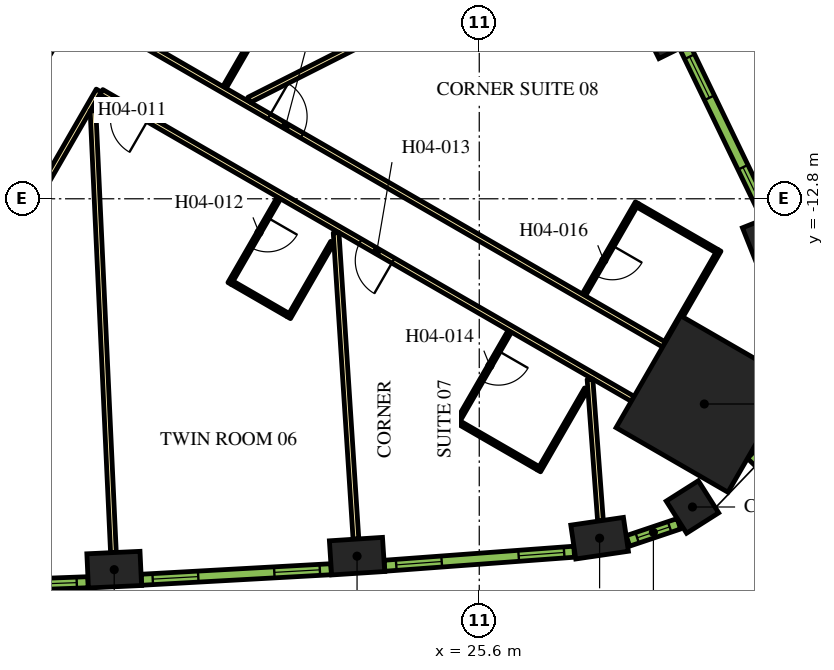
"""IFC4 building model, lengths in metres.
Left out: names, types, materials, properties, quantities, classifications, styles, units other than length and angle.
Written with IfcOpenShell. Run it as: python <this file> out.ifc"""

import sys

from ifc_helpers import new_model, si_unit, direction, frame, frame_2d, origin, origin_2d, place, context, subcontext, project, spatial, rectangle, extrude, element, fill, save


model = new_model("IFC4")
c1 = context("Model", 3, precision=1e-05, world=origin(), true_north=direction((0.0, 1.0)))
c2 = subcontext(c1, "Body", "Model", "MODEL_VIEW")
j1 = project(units=[si_unit("LENGTHUNIT", "METRE"), si_unit("PLANEANGLEUNIT", "RADIAN")], contexts=[c1])
p1 = place(None, origin())
s1 = spatial("IfcSite", under=j1, at=p1, CompositionType="ELEMENT")
p2 = place(p1, origin())
s2 = spatial("IfcBuilding", under=s1, at=p2, CompositionType="ELEMENT")
p3 = place(p2, frame((0.0, 0.0, 62.7)))
s3 = spatial("IfcBuildingStorey", under=s2, at=p3, CompositionType="ELEMENT", Elevation=62.7)
p4 = place(p3, frame((31.522, -18.199, 0.0), z_axis=(0.0, 0.0, 1.0), x_axis=(0.866025403784, -0.5, 0.0)))
e1 = element("IfcColumn", 1, at=p4, inside=s3, PredefinedType="COLUMN", context=c2, shape_type="SweptSolid", body=[
    extrude(rectangle(XDim=3.4, YDim=3.4, at=origin_2d()), origin(), (0.0, 0.0, 1.0), 3.9),
])
for number, where, z_axis, x_axis in (
    (2, (15.994, -22.558, 0.0), (0.0, 0.0, 1.0), (0.999, 0.046, 0.0)),
    (3, (22.385, -22.204, 0.0), (0.0, 0.0, 1.0), (0.998, 0.065, 0.0)),
    (4, (28.767, -21.731, 0.0), (0.0, 0.0, 1.0), (0.989, 0.145, 0.0)),
):
    element("IfcColumn", number, at=place(p3, frame(where, z_axis=z_axis, x_axis=x_axis)), inside=s3, PredefinedType="COLUMN", context=c2, shape_type="SweptSolid", body=[
        extrude(rectangle(XDim=1.4, YDim=0.9, at=origin_2d()), origin(), (0.0, 0.0, 1.0), 3.9),
    ])
p5 = place(p3, frame((31.21, -20.91, 0.0), z_axis=(0.0, 0.0, 1.0), x_axis=(0.844485001826, 0.535579202071, 0.0)))
e5 = element("IfcColumn", 5, at=p5, inside=s3, PredefinedType="COLUMN", context=c2, shape_type="SweptSolid", body=[
    extrude(rectangle(XDim=1.0, YDim=1.0, at=origin_2d()), origin(), (0.0, 0.0, 1.0), 3.9),
])
for number, where, z_axis, x_axis in (
    (6, (33.203, -14.047, 0.0), (0.0, 0.0, 1.0), (-0.369, 0.929, 0.0)),
    (7, (30.421, -8.284, 0.0), (0.0, 0.0, 1.0), (-0.443, 0.897, 0.0)),
):
    element("IfcColumn", number, at=place(p3, frame(where, z_axis=z_axis, x_axis=x_axis)), inside=s3, PredefinedType="COLUMN", context=c2, shape_type="SweptSolid", body=[
        extrude(rectangle(XDim=1.4, YDim=0.9, at=origin_2d()), origin(), (0.0, 0.0, 1.0), 3.9),
    ])
p6 = place(p3, frame((11.695, -12.644, 0.0), z_axis=(0.0, 0.0, 1.0), x_axis=(0.500010229568, 0.86601949766, 0.0)))
e8 = element("IfcWall", 8, at=p6, inside=s3, PredefinedType="SOLIDWALL", context=c2, shape_type="SweptSolid", body=[
    extrude(rectangle(XDim=9.326, YDim=0.9, at=frame_2d((4.663, 0.0))), origin(), (0.0, 0.0, 1.0), 3.9),
])
p7 = place(p3, frame((12.885, -9.431, 0.0), z_axis=(0.0, 0.0, 1.0), x_axis=(0.500020560727, 0.866013532718, 0.0)))
e9 = element("IfcWall", 9, at=p7, inside=s3, PredefinedType="SOLIDWALL", context=c2, shape_type="SweptSolid", body=[
    extrude(rectangle(XDim=3.45, YDim=0.25, at=frame_2d((1.725, 0.0))), origin(), (0.0, 0.0, 1.0), 3.9),
])
p8 = place(p3, frame((16.412, -8.523, 0.0), z_axis=(0.0, 0.0, 1.0), x_axis=(0.866022197818, -0.500005552856, 0.0)))
e10 = element("IfcWall", 10, at=p8, inside=s3, PredefinedType="PARTITIONING", context=c2, shape_type="SweptSolid", body=[
    extrude(rectangle(XDim=16.224, YDim=0.15, at=frame_2d((8.112, 0.0))), origin(), (0.0, 0.0, 1.0), 2.75),
])
p9 = place(p8, frame((4.223, 0.0, 0.0)))
e11 = element("IfcOpeningElement", 11, at=p9, cuts=e10, PredefinedType="OPENING", context=c2, shape_type="SweptSolid", body=[
    extrude(rectangle(XDim=1.0, YDim=2.1, at=frame_2d((0.5, 1.05))), frame((0.0, 0.085, 0.0), z_axis=(0.0, -1.0, 0.0), x_axis=(1.0, 0.0, 0.0)), (0.0, 0.0, 1.0), 0.17),
])
p10 = place(p3, frame((15.587, -9.952, 0.0), z_axis=(0.0, 0.0, 1.0), x_axis=(-0.500016618951, -0.866015808616, 0.0)))
e12 = element("IfcWall", 12, at=p10, inside=s3, PredefinedType="PARTITIONING", context=c2, shape_type="SweptSolid", body=[
    extrude(rectangle(XDim=5.268, YDim=0.15, at=frame_2d((2.634, 0.0))), origin(), (0.0, 0.0, 1.0), 2.75),
])
p11 = place(p3, frame((29.638, -18.064, 0.0), z_axis=(0.0, 0.0, 1.0), x_axis=(-0.866026175601, 0.499998663172, 0.0)))
e13 = element("IfcWall", 13, at=p11, inside=s3, PredefinedType="PARTITIONING", context=c2, shape_type="SweptSolid", body=[
    extrude(rectangle(XDim=16.144, YDim=0.15, at=frame_2d((8.072, 0.0))), origin(), (0.0, 0.0, 1.0), 2.75),
])
p12 = place(p11, frame((14.714, 0.0, 0.0)))
e14 = element("IfcOpeningElement", 14, at=p12, cuts=e13, PredefinedType="OPENING", context=c2, shape_type="SweptSolid", body=[
    extrude(rectangle(XDim=1.0, YDim=2.1, at=frame_2d((0.5, 1.05))), frame((0.0, 0.085, 0.0), z_axis=(0.0, -1.0, 0.0), x_axis=(1.0, 0.0, 0.0)), (0.0, 0.0, 1.0), 0.17),
])
p13 = place(p11, frame((7.275, 0.0, 0.0)))
e15 = element("IfcOpeningElement", 15, at=p13, cuts=e13, PredefinedType="OPENING", context=c2, shape_type="SweptSolid", body=[
    extrude(rectangle(XDim=1.0, YDim=2.1, at=frame_2d((0.5, 1.05))), frame((0.0, 0.085, 0.0), z_axis=(0.0, -1.0, 0.0), x_axis=(1.0, 0.0, 0.0)), (0.0, 0.0, 1.0), 0.17),
])
p14 = place(p3, frame((15.973, -22.109, 0.0), z_axis=(0.0, 0.0, 1.0), x_axis=(-0.046191717129, 0.998932592955, 0.0)))
e16 = element("IfcWall", 16, at=p14, inside=s3, PredefinedType="PARTITIONING", context=c2, shape_type="SweptSolid", body=[
    extrude(rectangle(XDim=11.638, YDim=0.15, at=frame_2d((5.819, 0.0))), origin(), (0.0, 0.0, 1.0), 2.75),
])
p15 = place(p3, frame((29.12, -5.356, 0.0), z_axis=(0.0, 0.0, 1.0), x_axis=(-0.892401965553, -0.451241323327, 0.0)))
e17 = element("IfcWall", 17, at=p15, inside=s3, PredefinedType="PARTITIONING", context=c2, shape_type="SweptSolid", body=[
    extrude(rectangle(XDim=10.729, YDim=0.15, at=frame_2d((5.364, 0.0))), origin(), (0.0, 0.0, 1.0), 2.75),
])
p16 = place(p3, frame((22.355, -21.754, 0.0), z_axis=(0.0, 0.0, 1.0), x_axis=(-0.064639533143, 0.997908678565, 0.0)))
e18 = element("IfcWall", 18, at=p16, inside=s3, PredefinedType="PARTITIONING", context=c2, shape_type="SweptSolid", body=[
    extrude(rectangle(XDim=8.079, YDim=0.15, at=frame_2d((4.04, 0.0))), origin(), (0.0, 0.0, 1.0), 2.75),
])
p17 = place(p3, frame((28.79, -21.273, 0.0), z_axis=(0.0, 0.0, 1.0), x_axis=(-0.07382592098, 0.997271143366, 0.0)))
e19 = element("IfcWall", 19, at=p17, inside=s3, PredefinedType="PARTITIONING", context=c2, shape_type="SweptSolid", body=[
    extrude(rectangle(XDim=3.734, YDim=0.15, at=frame_2d((1.867, 0.0))), origin(), (0.0, 0.0, 1.0), 2.75),
])
p18 = place(p3, frame((20.33, -12.777, 0.0), z_axis=(0.0, 0.0, 1.0), x_axis=(-0.500006934395, -0.866021400173, 0.0)))
e20 = element("IfcWall", 20, at=p18, inside=s3, PredefinedType="PARTITIONING", context=c2, shape_type="SweptSolid", body=[
    extrude(rectangle(XDim=2.6, YDim=0.1, at=frame_2d((1.3, 0.0))), origin(), (0.0, 0.0, 1.0), 2.75),
])
p19 = place(p18, frame((0.6, 0.0, 0.0)))
e21 = element("IfcOpeningElement", 21, at=p19, cuts=e20, PredefinedType="OPENING", context=c2, shape_type="SweptSolid", body=[
    extrude(rectangle(XDim=0.9, YDim=2.1, at=frame_2d((0.45, 1.05))), frame((0.0, 0.06, 0.0), z_axis=(0.0, -1.0, 0.0), x_axis=(1.0, 0.0, 0.0)), (0.0, 0.0, 1.0), 0.12),
])
p20 = place(p3, frame((19.098, -15.01, 0.0), z_axis=(0.0, 0.0, 1.0), x_axis=(0.86605165483, -0.499954529098, 0.0)))
e22 = element("IfcWall", 22, at=p20, inside=s3, PredefinedType="PARTITIONING", context=c2, shape_type="SweptSolid", body=[
    extrude(rectangle(XDim=1.7, YDim=0.1, at=frame_2d((0.85, 0.0))), origin(), (0.0, 0.0, 1.0), 2.75),
])
p21 = place(p3, frame((21.734, -13.945, 0.0), z_axis=(0.0, 0.0, 1.0), x_axis=(-0.500014693593, -0.866016920268, 0.0)))
e23 = element("IfcWall", 23, at=p21, inside=s3, PredefinedType="PARTITIONING", context=c2, shape_type="SweptSolid", body=[
    extrude(rectangle(XDim=2.29, YDim=0.1, at=frame_2d((1.145, 0.0))), origin(), (0.0, 0.0, 1.0), 2.75),
])
p22 = place(p3, frame((26.405, -16.284, 0.0), z_axis=(0.0, 0.0, 1.0), x_axis=(-0.49998411664, -0.866034573852, 0.0)))
e24 = element("IfcWall", 24, at=p22, inside=s3, PredefinedType="PARTITIONING", context=c2, shape_type="SweptSolid", body=[
    extrude(rectangle(XDim=2.8, YDim=0.1, at=frame_2d((1.4, 0.0))), origin(), (0.0, 0.0, 1.0), 2.75),
])
p23 = place(p22, frame((0.6, 0.0, 0.0)))
e25 = element("IfcOpeningElement", 25, at=p23, cuts=e24, PredefinedType="OPENING", context=c2, shape_type="SweptSolid", body=[
    extrude(rectangle(XDim=0.9, YDim=2.1, at=frame_2d((0.45, 1.05))), frame((0.0, 0.06, 0.0), z_axis=(0.0, -1.0, 0.0), x_axis=(1.0, 0.0, 0.0)), (0.0, 0.0, 1.0), 0.12),
])
p24 = place(p3, frame((25.073, -18.691, 0.0), z_axis=(0.0, 0.0, 1.0), x_axis=(0.866024647952, -0.500001309137, 0.0)))
e26 = element("IfcWall", 26, at=p24, inside=s3, PredefinedType="PARTITIONING", context=c2, shape_type="SweptSolid", body=[
    extrude(rectangle(XDim=2.4, YDim=0.1, at=frame_2d((1.2, 0.0))), origin(), (0.0, 0.0, 1.0), 2.75),
])
p25 = place(p3, frame((28.415, -17.802, 0.0), z_axis=(0.0, 0.0, 1.0), x_axis=(-0.499945955465, -0.866056604163, 0.0)))
e27 = element("IfcWall", 27, at=p25, inside=s3, PredefinedType="PARTITIONING", context=c2, shape_type="SweptSolid", body=[
    extrude(rectangle(XDim=2.49, YDim=0.1, at=frame_2d((1.245, 0.0))), origin(), (0.0, 0.0, 1.0), 2.75),
])
p26 = place(p3, frame((29.752, -12.905, 0.0), z_axis=(0.0, 0.0, 1.0), x_axis=(-0.500049511043, -0.865996816683, 0.0)))
e28 = element("IfcWall", 28, at=p26, inside=s3, PredefinedType="PARTITIONING", context=c2, shape_type="SweptSolid", body=[
    extrude(rectangle(XDim=2.8, YDim=0.1, at=frame_2d((1.4, 0.0))), origin(), (0.0, 0.0, 1.0), 2.75),
])
p27 = place(p26, frame((1.3, 0.0, 0.0)))
e29 = element("IfcOpeningElement", 29, at=p27, cuts=e28, PredefinedType="OPENING", context=c2, shape_type="SweptSolid", body=[
    extrude(rectangle(XDim=0.9, YDim=2.1, at=frame_2d((0.45, 1.05))), frame((0.0, 0.06, 0.0), z_axis=(0.0, -1.0, 0.0), x_axis=(1.0, 0.0, 0.0)), (0.0, 0.0, 1.0), 0.12),
])
p28 = place(p3, frame((29.771, -12.973, 0.0), z_axis=(0.0, 0.0, 1.0), x_axis=(0.865980596518, -0.500077600433, 0.0)))
e30 = element("IfcWall", 30, at=p28, inside=s3, PredefinedType="PARTITIONING", context=c2, shape_type="SweptSolid", body=[
    extrude(rectangle(XDim=2.4, YDim=0.1, at=frame_2d((1.2, 0.0))), origin(), (0.0, 0.0, 1.0), 2.75),
])
p29 = place(p3, frame((30.518, -16.58, 0.0), z_axis=(0.0, 0.0, 1.0), x_axis=(0.49998411664, 0.866034573852, 0.0)))
e31 = element("IfcWall", 31, at=p29, inside=s3, PredefinedType="PARTITIONING", context=c2, shape_type="SweptSolid", body=[
    extrude(rectangle(XDim=2.8, YDim=0.1, at=frame_2d((1.4, 0.0))), origin(), (0.0, 0.0, 1.0), 2.75),
])
p30 = place(p3, frame((20.109, -7.771, 0.0), z_axis=(0.0, 0.0, 1.0), x_axis=(-0.500077573772, -0.865980611914, 0.0)))
e32 = element("IfcWall", 32, at=p30, inside=s3, PredefinedType="PARTITIONING", context=c2, shape_type="SweptSolid", body=[
    extrude(rectangle(XDim=2.42, YDim=0.1, at=frame_2d((1.21, 0.0))), origin(), (0.0, 0.0, 1.0), 2.75),
])
p31 = place(p3, frame((10.31, -23.074, 0.0), z_axis=(0.0, 0.0, 1.0), x_axis=(0.999317974969, 0.036926750529, 0.0)))
e33 = element("IfcWall", 33, at=p31, inside=s3, PredefinedType="SOLIDWALL", context=c2, shape_type="SweptSolid", body=[
    extrude(rectangle(XDim=4.998, YDim=0.29, at=frame_2d((2.499, 0.0))), origin(), (0.0, 0.0, 1.0), 3.65),
])
p32 = place(p31, frame((0.297, 0.0, 0.9)))
e34 = element("IfcOpeningElement", 34, at=p32, cuts=e33, PredefinedType="OPENING", context=c2, shape_type="SweptSolid", body=[
    extrude(rectangle(XDim=1.2, YDim=2.15, at=frame_2d((0.6, 1.075))), frame((0.0, 0.155, 0.0), z_axis=(0.0, -1.0, 0.0), x_axis=(1.0, 0.0, 0.0)), (0.0, 0.0, 1.0), 0.31),
])
p33 = place(p31, frame((3.501, 0.0, 0.9)))
e35 = element("IfcOpeningElement", 35, at=p33, cuts=e33, PredefinedType="OPENING", context=c2, shape_type="SweptSolid", body=[
    extrude(rectangle(XDim=1.2, YDim=2.15, at=frame_2d((0.6, 1.075))), frame((0.0, 0.155, 0.0), z_axis=(0.0, -1.0, 0.0), x_axis=(1.0, 0.0, 0.0)), (0.0, 0.0, 1.0), 0.31),
])
p34 = place(p3, frame((16.711, -22.824, 0.0), z_axis=(0.0, 0.0, 1.0), x_axis=(0.998464708705, 0.055391564976, 0.0)))
e36 = element("IfcWall", 36, at=p34, inside=s3, PredefinedType="SOLIDWALL", context=c2, shape_type="SweptSolid", body=[
    extrude(rectangle(XDim=4.998, YDim=0.29, at=frame_2d((2.499, 0.0))), origin(), (0.0, 0.0, 1.0), 3.65),
])
p35 = place(p34, frame((0.297, 0.0, 0.9)))
e37 = element("IfcOpeningElement", 37, at=p35, cuts=e36, PredefinedType="OPENING", context=c2, shape_type="SweptSolid", body=[
    extrude(rectangle(XDim=1.2, YDim=2.15, at=frame_2d((0.6, 1.075))), frame((0.0, 0.155, 0.0), z_axis=(0.0, -1.0, 0.0), x_axis=(1.0, 0.0, 0.0)), (0.0, 0.0, 1.0), 0.31),
])
p36 = place(p34, frame((3.501, 0.0, 0.9)))
e38 = element("IfcOpeningElement", 38, at=p36, cuts=e36, PredefinedType="OPENING", context=c2, shape_type="SweptSolid", body=[
    extrude(rectangle(XDim=1.2, YDim=2.15, at=frame_2d((0.6, 1.075))), frame((0.0, 0.155, 0.0), z_axis=(0.0, -1.0, 0.0), x_axis=(1.0, 0.0, 0.0)), (0.0, 0.0, 1.0), 0.31),
])
p37 = place(p3, frame((23.106, -22.456, 0.0), z_axis=(0.0, 0.0, 1.0), x_axis=(0.997266290399, 0.073891447643, 0.0)))
e39 = element("IfcWall", 39, at=p37, inside=s3, PredefinedType="SOLIDWALL", context=c2, shape_type="SweptSolid", body=[
    extrude(rectangle(XDim=5.006, YDim=0.29, at=frame_2d((2.503, 0.0))), origin(), (0.0, 0.0, 1.0), 3.65),
])
p38 = place(p37, frame((0.31, 0.0, 0.9)))
e40 = element("IfcOpeningElement", 40, at=p38, cuts=e39, PredefinedType="OPENING", context=c2, shape_type="SweptSolid", body=[
    extrude(rectangle(XDim=1.2, YDim=2.15, at=frame_2d((0.6, 1.075))), frame((0.0, 0.155, 0.0), z_axis=(0.0, -1.0, 0.0), x_axis=(1.0, 0.0, 0.0)), (0.0, 0.0, 1.0), 0.31),
])
p39 = place(p37, frame((3.54, 0.0, 0.9)))
e41 = element("IfcOpeningElement", 41, at=p39, cuts=e39, PredefinedType="OPENING", context=c2, shape_type="SweptSolid", body=[
    extrude(rectangle(XDim=1.2, YDim=2.15, at=frame_2d((0.6, 1.075))), frame((0.0, 0.155, 0.0), z_axis=(0.0, -1.0, 0.0), x_axis=(1.0, 0.0, 0.0)), (0.0, 0.0, 1.0), 0.31),
])
p40 = place(p3, frame((29.512, -21.802, 0.0), z_axis=(0.0, 0.0, 1.0), x_axis=(0.947903891592, 0.318556450734, 0.0)))
e42 = element("IfcWall", 42, at=p40, inside=s3, PredefinedType="SOLIDWALL", context=c2, shape_type="SweptSolid", body=[
    extrude(rectangle(XDim=1.415, YDim=0.29, at=frame_2d((0.708, 0.0))), origin(), (0.0, 0.0, 1.0), 3.65),
])
p41 = place(p40, frame((0.257, 0.0, 0.9)))
e43 = element("IfcOpeningElement", 43, at=p41, cuts=e42, PredefinedType="OPENING", context=c2, shape_type="SweptSolid", body=[
    extrude(rectangle(XDim=0.9, YDim=2.15, at=frame_2d((0.45, 1.075))), frame((0.0, 0.155, 0.0), z_axis=(0.0, -1.0, 0.0), x_axis=(1.0, 0.0, 0.0)), (0.0, 0.0, 1.0), 0.31),
])
p42 = place(p3, frame((32.762, -19.732, 0.0), z_axis=(0.0, 0.0, 1.0), x_axis=(0.692252359589, 0.721655506903, 0.0)))
e44 = element("IfcWall", 44, at=p42, inside=s3, PredefinedType="SOLIDWALL", context=c2, shape_type="SweptSolid", body=[
    extrude(rectangle(XDim=0.764, YDim=0.29, at=frame_2d((0.382, 0.0))), origin(), (0.0, 0.0, 1.0), 3.65),
])
p43 = place(p3, frame((33.176, -13.29, 0.0), z_axis=(0.0, 0.0, 1.0), x_axis=(-0.434664499056, 0.900592456808, 0.0)))
e45 = element("IfcWall", 45, at=p43, inside=s3, PredefinedType="SOLIDWALL", context=c2, shape_type="SweptSolid", body=[
    extrude(rectangle(XDim=5.006, YDim=0.29, at=frame_2d((2.503, 0.0))), origin(), (0.0, 0.0, 1.0), 3.65),
])
p44 = place(p43, frame((0.265, 0.0, 0.9)))
e46 = element("IfcOpeningElement", 46, at=p44, cuts=e45, PredefinedType="OPENING", context=c2, shape_type="SweptSolid", body=[
    extrude(rectangle(XDim=1.2, YDim=2.15, at=frame_2d((0.6, 1.075))), frame((0.0, 0.155, 0.0), z_axis=(0.0, -1.0, 0.0), x_axis=(1.0, 0.0, 0.0)), (0.0, 0.0, 1.0), 0.31),
])
p45 = place(p43, frame((3.496, 0.0, 0.9)))
e47 = element("IfcOpeningElement", 47, at=p45, cuts=e45, PredefinedType="OPENING", context=c2, shape_type="SweptSolid", body=[
    extrude(rectangle(XDim=1.2, YDim=2.15, at=frame_2d((0.6, 1.075))), frame((0.0, 0.155, 0.0), z_axis=(0.0, -1.0, 0.0), x_axis=(1.0, 0.0, 0.0)), (0.0, 0.0, 1.0), 0.31),
])
p46 = place(p12, origin())
e48 = element("IfcDoor", 48, at=p46, inside=s3, OperationType="SINGLE_SWING_RIGHT", PredefinedType="DOOR", context=c2, shape_type="SweptSolid", body=[
    extrude(rectangle(XDim=1.0, YDim=2.1, at=frame_2d((0.5, 1.05))), frame((0.0, 0.025, 0.0), z_axis=(0.0, -1.0, 0.0), x_axis=(1.0, 0.0, 0.0)), (0.0, 0.0, 1.0), 0.05),
])
fill(e14, e48)
p47 = place(p19, origin())
e49 = element("IfcDoor", 49, at=p47, inside=s3, OperationType="SINGLE_SWING_RIGHT", PredefinedType="DOOR", context=c2, shape_type="SweptSolid", body=[
    extrude(rectangle(XDim=0.9, YDim=2.1, at=frame_2d((0.45, 1.05))), frame((0.0, 0.025, 0.0), z_axis=(0.0, -1.0, 0.0), x_axis=(1.0, 0.0, 0.0)), (0.0, 0.0, 1.0), 0.05),
])
fill(e21, e49)
p48 = place(p13, origin())
e50 = element("IfcDoor", 50, at=p48, inside=s3, OperationType="SINGLE_SWING_RIGHT", PredefinedType="DOOR", context=c2, shape_type="SweptSolid", body=[
    extrude(rectangle(XDim=1.0, YDim=2.1, at=frame_2d((0.5, 1.05))), frame((0.0, 0.025, 0.0), z_axis=(0.0, -1.0, 0.0), x_axis=(1.0, 0.0, 0.0)), (0.0, 0.0, 1.0), 0.05),
])
fill(e15, e50)
p49 = place(p23, origin())
e51 = element("IfcDoor", 51, at=p49, inside=s3, OperationType="SINGLE_SWING_LEFT", PredefinedType="DOOR", context=c2, shape_type="SweptSolid", body=[
    extrude(rectangle(XDim=0.9, YDim=2.1, at=frame_2d((0.45, 1.05))), frame((0.0, 0.025, 0.0), z_axis=(0.0, -1.0, 0.0), x_axis=(1.0, 0.0, 0.0)), (0.0, 0.0, 1.0), 0.05),
])
fill(e25, e51)
p50 = place(p9, origin())
e52 = element("IfcDoor", 52, at=p50, inside=s3, OperationType="SINGLE_SWING_LEFT", PredefinedType="DOOR", context=c2, shape_type="SweptSolid", body=[
    extrude(rectangle(XDim=1.0, YDim=2.1, at=frame_2d((0.5, 1.05))), frame((0.0, 0.025, 0.0), z_axis=(0.0, -1.0, 0.0), x_axis=(1.0, 0.0, 0.0)), (0.0, 0.0, 1.0), 0.05),
])
fill(e11, e52)
p51 = place(p27, origin())
e53 = element("IfcDoor", 53, at=p51, inside=s3, OperationType="SINGLE_SWING_LEFT", PredefinedType="DOOR", context=c2, shape_type="SweptSolid", body=[
    extrude(rectangle(XDim=0.9, YDim=2.1, at=frame_2d((0.45, 1.05))), frame((0.0, 0.025, 0.0), z_axis=(0.0, -1.0, 0.0), x_axis=(1.0, 0.0, 0.0)), (0.0, 0.0, 1.0), 0.05),
])
fill(e29, e53)
p52 = place(p33, origin())
e54 = element("IfcWindow", 54, at=p52, inside=s3, PartitioningType="DOUBLE_PANEL_VERTICAL", PredefinedType="WINDOW", context=c2, shape_type="SweptSolid", body=[
    extrude(rectangle(XDim=1.2, YDim=2.15, at=frame_2d((0.6, 1.075))), frame((0.0, 0.015, 0.0), z_axis=(0.0, -1.0, 0.0), x_axis=(1.0, 0.0, 0.0)), (0.0, 0.0, 1.0), 0.06),
])
fill(e35, e54)
p53 = place(p35, origin())
e55 = element("IfcWindow", 55, at=p53, inside=s3, PartitioningType="DOUBLE_PANEL_VERTICAL", PredefinedType="WINDOW", context=c2, shape_type="SweptSolid", body=[
    extrude(rectangle(XDim=1.2, YDim=2.15, at=frame_2d((0.6, 1.075))), frame((0.0, 0.015, 0.0), z_axis=(0.0, -1.0, 0.0), x_axis=(1.0, 0.0, 0.0)), (0.0, 0.0, 1.0), 0.06),
])
fill(e37, e55)
p54 = place(p36, origin())
e56 = element("IfcWindow", 56, at=p54, inside=s3, PartitioningType="DOUBLE_PANEL_VERTICAL", PredefinedType="WINDOW", context=c2, shape_type="SweptSolid", body=[
    extrude(rectangle(XDim=1.2, YDim=2.15, at=frame_2d((0.6, 1.075))), frame((0.0, 0.015, 0.0), z_axis=(0.0, -1.0, 0.0), x_axis=(1.0, 0.0, 0.0)), (0.0, 0.0, 1.0), 0.06),
])
fill(e38, e56)
p55 = place(p38, origin())
e57 = element("IfcWindow", 57, at=p55, inside=s3, PartitioningType="DOUBLE_PANEL_VERTICAL", PredefinedType="WINDOW", context=c2, shape_type="SweptSolid", body=[
    extrude(rectangle(XDim=1.2, YDim=2.15, at=frame_2d((0.6, 1.075))), frame((0.0, 0.015, 0.0), z_axis=(0.0, -1.0, 0.0), x_axis=(1.0, 0.0, 0.0)), (0.0, 0.0, 1.0), 0.06),
])
fill(e40, e57)
p56 = place(p39, origin())
e58 = element("IfcWindow", 58, at=p56, inside=s3, PartitioningType="DOUBLE_PANEL_VERTICAL", PredefinedType="WINDOW", context=c2, shape_type="SweptSolid", body=[
    extrude(rectangle(XDim=1.2, YDim=2.15, at=frame_2d((0.6, 1.075))), frame((0.0, 0.015, 0.0), z_axis=(0.0, -1.0, 0.0), x_axis=(1.0, 0.0, 0.0)), (0.0, 0.0, 1.0), 0.06),
])
fill(e41, e58)
p57 = place(p41, origin())
e59 = element("IfcWindow", 59, at=p57, inside=s3, PartitioningType="SINGLE_PANEL", PredefinedType="WINDOW", context=c2, shape_type="SweptSolid", body=[
    extrude(rectangle(XDim=0.9, YDim=2.15, at=frame_2d((0.45, 1.075))), frame((0.0, 0.015, 0.0), z_axis=(0.0, -1.0, 0.0), x_axis=(1.0, 0.0, 0.0)), (0.0, 0.0, 1.0), 0.06),
])
fill(e43, e59)
p58 = place(p44, origin())
e60 = element("IfcWindow", 60, at=p58, inside=s3, PartitioningType="DOUBLE_PANEL_VERTICAL", PredefinedType="WINDOW", context=c2, shape_type="SweptSolid", body=[
    extrude(rectangle(XDim=1.2, YDim=2.15, at=frame_2d((0.6, 1.075))), frame((0.0, 0.015, 0.0), z_axis=(0.0, -1.0, 0.0), x_axis=(1.0, 0.0, 0.0)), (0.0, 0.0, 1.0), 0.06),
])
fill(e46, e60)
p59 = place(p45, origin())
e61 = element("IfcWindow", 61, at=p59, inside=s3, PartitioningType="DOUBLE_PANEL_VERTICAL", PredefinedType="WINDOW", context=c2, shape_type="SweptSolid", body=[
    extrude(rectangle(XDim=1.2, YDim=2.15, at=frame_2d((0.6, 1.075))), frame((0.0, 0.015, 0.0), z_axis=(0.0, -1.0, 0.0), x_axis=(1.0, 0.0, 0.0)), (0.0, 0.0, 1.0), 0.06),
])
fill(e47, e61)
save(model, sys.argv[1])
